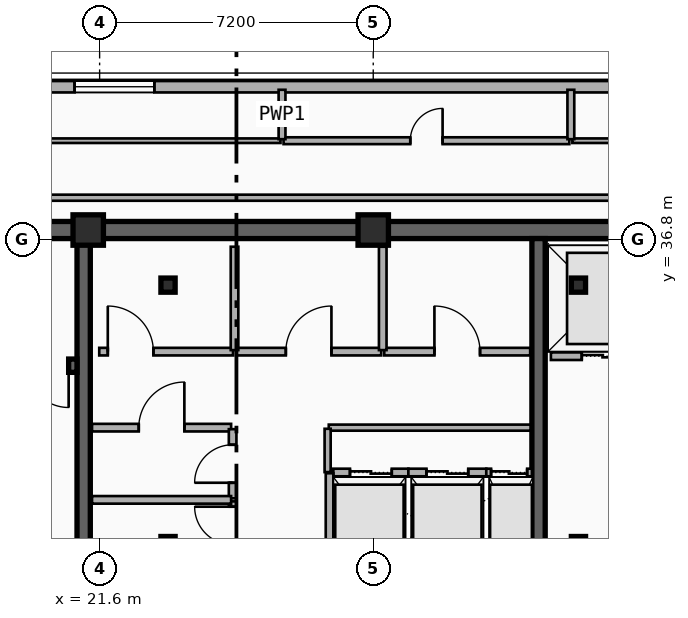
"""IFC4 building model, lengths in metres.
Left out: names, types, materials, properties, quantities, classifications, styles, units other than length and angle.
Written with IfcOpenShell. Run it as: python <this file> out.ifc"""

import sys

from ifc_helpers import new_model, si_unit, direction, frame, frame_2d, origin, origin_2d, place, context, subcontext, project, spatial, rectangle, i_section, extrude, element, fill, save


model = new_model("IFC4")
c1 = context("Model", 3, precision=1e-05, world=origin(), true_north=direction((0.0, 1.0)))
c2 = subcontext(c1, "Body", "Model", "MODEL_VIEW")
j1 = project(units=[si_unit("LENGTHUNIT", "METRE"), si_unit("PLANEANGLEUNIT", "RADIAN")], contexts=[c1])
p1 = place(None, origin())
s1 = spatial("IfcSite", under=j1, at=p1, CompositionType="ELEMENT")
p2 = place(p1, origin())
s2 = spatial("IfcBuilding", under=s1, at=p2, CompositionType="ELEMENT")
p3 = place(p2, frame((0.0, 0.0, 276.9)))
s3 = spatial("IfcBuildingStorey", under=s2, at=p3, CompositionType="ELEMENT", Elevation=276.9)
p4 = place(p3, frame((12.15, 37.05, 0.0), z_axis=(0.0, 0.0, 1.0), x_axis=(1.0, 0.0, 0.0)))
e1 = element("IfcWall", 1, at=p4, inside=s3, PredefinedType="SHEAR", context=c2, shape_type="SweptSolid", body=[
    extrude(rectangle(XDim=33.23, YDim=0.45, at=frame_2d((16.615, 0.0))), origin(), (0.0, 0.0, 1.0), 3.7),
])
for number, where, z_axis, x_axis in (
    (2, (21.18, 28.045, 0.0), (0.0, 0.0, 1.0), (0.0, 1.0, 0.0)),
    (3, (33.15, 28.045, 0.0), (0.0, 0.0, 1.0), (0.0, 1.0, 0.0)),
):
    element("IfcWall", number, at=place(p3, frame(where, z_axis=z_axis, x_axis=x_axis)), inside=s3, PredefinedType="SHEAR", context=c2, shape_type="SweptSolid", body=[
        extrude(rectangle(XDim=8.78, YDim=0.35, at=frame_2d((4.39, 0.0))), origin(), (0.0, 0.0, 1.0), 3.7),
    ])
p5 = place(p3, frame((21.005, 33.48, 0.0), z_axis=(0.0, 0.0, 1.0), x_axis=(-1.0, 0.0, 0.0)))
e4 = element("IfcWall", 4, at=p5, inside=s3, PredefinedType="SHEAR", context=c2, shape_type="SweptSolid", body=[
    extrude(rectangle(XDim=8.63, YDim=0.35, at=frame_2d((4.315, 0.0))), origin(), (0.0, 0.0, 1.0), 3.7),
])
p6 = place(p5, frame((0.22, 0.0, 0.0)))
e5 = element("IfcOpeningElement", 5, at=p6, cuts=e4, PredefinedType="OPENING", context=c2, shape_type="SweptSolid", body=[
    extrude(rectangle(XDim=1.1, YDim=2.15, at=frame_2d((0.55, 1.075))), frame((0.0, 0.185, 0.0), z_axis=(0.0, -1.0, 0.0), x_axis=(1.0, 0.0, 0.0)), (0.0, 0.0, 1.0), 0.37),
])
for number, where, z_axis, x_axis in (
    (6, (23.4, 28.8, 0.0), (0.0, 0.0, 1.0), (1.0, 0.0, 0.0)),
    (7, (34.2, 28.8, 0.0), (0.0, 0.0, 1.0), (1.0, 0.0, 0.0)),
    (8, (34.2, 35.6, 0.0), (0.0, 0.0, 1.0), (1.0, 0.0, 0.0)),
    (9, (23.4, 35.6, 0.0), (0.0, 0.0, 1.0), (1.0, 0.0, 0.0)),
):
    element("IfcColumn", number, at=place(p3, frame(where, z_axis=z_axis, x_axis=x_axis)), inside=s3, PredefinedType="COLUMN", context=c2, shape_type="SweptSolid", body=[
        extrude(i_section(OverallWidth=0.374, OverallDepth=0.372, WebThickness=0.017, FlangeThickness=0.027, FilletRadius=0.015, at=origin_2d()), origin(), (0.0, 0.0, 1.0), 3.7),
    ])
for number, where, z_axis, x_axis in (
    (10, (21.3, 37.05, 0.0), (0.0, 0.0, 1.0), (1.0, 0.0, 0.0)),
    (11, (28.8, 37.05, 0.0), (0.0, 0.0, 1.0), (1.0, 0.0, 0.0)),
):
    element("IfcColumn", number, at=place(p3, frame(where, z_axis=z_axis, x_axis=x_axis)), inside=s3, PredefinedType="COLUMN", context=c2, shape_type="SweptSolid", body=[
        extrude(rectangle(XDim=0.8, YDim=0.8, at=origin_2d()), origin(), (0.0, 0.0, 1.0), 3.7),
    ])
p7 = place(p3, frame((12.4, 40.82, 0.0), z_axis=(0.0, 0.0, 1.0), x_axis=(1.0, 0.0, 0.0)))
e12 = element("IfcWall", 12, at=p7, inside=s3, PredefinedType="SOLIDWALL", context=c2, shape_type="SweptSolid", body=[
    extrude(rectangle(XDim=32.8, YDim=0.3, at=frame_2d((16.4, 0.0))), origin(), (0.0, 0.0, 1.0), 3.38),
])
p8 = place(p7, frame((3.38, 0.0, 0.75)))
e13 = element("IfcOpeningElement", 13, at=p8, cuts=e12, PredefinedType="OPENING", context=c2, shape_type="SweptSolid", body=[
    extrude(rectangle(XDim=2.1, YDim=2.1, at=frame_2d((1.05, 1.05))), frame((0.0, 0.16, 0.0), z_axis=(0.0, -1.0, 0.0), x_axis=(1.0, 0.0, 0.0)), (0.0, 0.0, 1.0), 0.32),
])
p9 = place(p7, frame((8.54, 0.0, 0.75)))
e14 = element("IfcOpeningElement", 14, at=p9, cuts=e12, PredefinedType="OPENING", context=c2, shape_type="SweptSolid", body=[
    extrude(rectangle(XDim=2.1, YDim=2.1, at=frame_2d((1.05, 1.05))), frame((0.0, 0.16, 0.0), z_axis=(0.0, -1.0, 0.0), x_axis=(1.0, 0.0, 0.0)), (0.0, 0.0, 1.0), 0.32),
])
p10 = place(p3, frame((33.475, 33.73, 0.0), z_axis=(0.0, 0.0, 1.0), x_axis=(1.0, 0.0, 0.0)))
e15 = element("IfcWall", 15, at=p10, inside=s3, PredefinedType="PARTITIONING", context=c2, shape_type="SweptSolid", body=[
    extrude(rectangle(XDim=2.725, YDim=0.2, at=frame_2d((1.362, 0.0))), origin(), (0.0, 0.0, 1.0), 2.45),
])
p11 = place(p10, frame((0.812, 0.0, 0.0)))
e16 = element("IfcOpeningElement", 16, at=p11, cuts=e15, PredefinedType="OPENING", context=c2, shape_type="SweptSolid", body=[
    extrude(rectangle(XDim=1.1, YDim=2.15, at=frame_2d((0.55, 1.075))), frame((0.0, 0.11, 0.0), z_axis=(0.0, -1.0, 0.0), x_axis=(1.0, 0.0, 0.0)), (0.0, 0.0, 1.0), 0.22),
])
p12 = place(p3, frame((27.75, 30.67, 0.0), z_axis=(0.0, 0.0, 1.0), x_axis=(1.0, 0.0, 0.0)))
e17 = element("IfcWall", 17, at=p12, inside=s3, PredefinedType="PARTITIONING", context=c2, shape_type="SweptSolid", body=[
    extrude(rectangle(XDim=1.975, YDim=0.2, at=frame_2d((0.988, 0.0))), origin(), (0.0, 0.0, 1.0), 2.45),
])
p13 = place(p12, frame((0.438, 0.0, 0.0)))
e18 = element("IfcOpeningElement", 18, at=p13, cuts=e17, PredefinedType="OPENING", context=c2, shape_type="SweptSolid", body=[
    extrude(rectangle(XDim=1.1, YDim=2.15, at=frame_2d((0.55, 1.075))), frame((0.0, 0.11, 0.0), z_axis=(0.0, -1.0, 0.0), x_axis=(1.0, 0.0, 0.0)), (0.0, 0.0, 1.0), 0.22),
])
p14 = place(p3, frame((27.65, 28.07, 0.0), z_axis=(0.0, 0.0, 1.0), x_axis=(0.0, 1.0, 0.0)))
e19 = element("IfcWall", 19, at=p14, inside=s3, PredefinedType="PARTITIONING", context=c2, shape_type="SweptSolid", body=[
    extrude(rectangle(XDim=2.58, YDim=0.2, at=frame_2d((1.29, 0.0))), origin(), (0.0, 0.0, 1.0), 2.45),
])
p15 = place(p3, frame((29.725, 30.67, 0.0), z_axis=(0.0, 0.0, 1.0), x_axis=(1.0, 0.0, 0.0)))
e20 = element("IfcWall", 20, at=p15, inside=s3, PredefinedType="PARTITIONING", context=c2, shape_type="SweptSolid", body=[
    extrude(rectangle(XDim=2.05, YDim=0.2, at=frame_2d((1.025, 0.0))), origin(), (0.0, 0.0, 1.0), 2.76),
])
p16 = place(p15, frame((0.475, 0.0, 0.0)))
e21 = element("IfcOpeningElement", 21, at=p16, cuts=e20, PredefinedType="OPENING", context=c2, shape_type="SweptSolid", body=[
    extrude(rectangle(XDim=1.1, YDim=2.15, at=frame_2d((0.55, 1.075))), frame((0.0, 0.11, 0.0), z_axis=(0.0, -1.0, 0.0), x_axis=(1.0, 0.0, 0.0)), (0.0, 0.0, 1.0), 0.22),
])
p17 = place(p3, frame((31.775, 30.67, 0.0), z_axis=(0.0, 0.0, 1.0), x_axis=(1.0, 0.0, 0.0)))
e22 = element("IfcWall", 22, at=p17, inside=s3, PredefinedType="PARTITIONING", context=c2, shape_type="SweptSolid", body=[
    extrude(rectangle(XDim=1.2, YDim=0.2, at=frame_2d((0.6, 0.0))), origin(), (0.0, 0.0, 1.0), 2.76),
])
p18 = place(p17, frame((0.125, 0.0, 0.0)))
e23 = element("IfcOpeningElement", 23, at=p18, cuts=e22, PredefinedType="OPENING", context=c2, shape_type="SweptSolid", body=[
    extrude(rectangle(XDim=0.95, YDim=2.15, at=frame_2d((0.475, 1.075))), frame((0.0, 0.11, 0.0), z_axis=(0.0, -1.0, 0.0), x_axis=(1.0, 0.0, 0.0)), (0.0, 0.0, 1.0), 0.22),
])
p19 = place(p3, frame((21.4, 31.85, 0.0), z_axis=(0.0, 0.0, 1.0), x_axis=(1.0, 0.0, 0.0)))
e24 = element("IfcWall", 24, at=p19, inside=s3, PredefinedType="PARTITIONING", context=c2, shape_type="SweptSolid", body=[
    extrude(rectangle(XDim=3.66, YDim=0.2, at=frame_2d((1.83, 0.0))), origin(), (0.0, 0.0, 1.0), 2.45),
])
p20 = place(p19, frame((1.23, 0.0, 0.0)))
e25 = element("IfcOpeningElement", 25, at=p20, cuts=e24, PredefinedType="OPENING", context=c2, shape_type="SweptSolid", body=[
    extrude(rectangle(XDim=1.2, YDim=2.15, at=frame_2d((0.6, 1.075))), frame((0.0, 0.11, 0.0), z_axis=(0.0, -1.0, 0.0), x_axis=(1.0, 0.0, 0.0)), (0.0, 0.0, 1.0), 0.22),
])
p21 = place(p3, frame((21.59, 33.85, 0.0), z_axis=(0.0, 0.0, 1.0), x_axis=(1.0, 0.0, 0.0)))
e26 = element("IfcWall", 26, at=p21, inside=s3, PredefinedType="PARTITIONING", context=c2, shape_type="SweptSolid", body=[
    extrude(rectangle(XDim=3.52, YDim=0.2, at=frame_2d((1.76, 0.0))), origin(), (0.0, 0.0, 1.0), 2.45),
])
p22 = place(p21, frame((0.225, 0.0, 0.0)))
e27 = element("IfcOpeningElement", 27, at=p22, cuts=e26, PredefinedType="OPENING", context=c2, shape_type="SweptSolid", body=[
    extrude(rectangle(XDim=1.2, YDim=2.15, at=frame_2d((0.6, 1.075))), frame((0.0, 0.11, 0.0), z_axis=(0.0, -1.0, 0.0), x_axis=(1.0, 0.0, 0.0)), (0.0, 0.0, 1.0), 0.22),
])
p23 = place(p3, frame((25.19, 33.85, 0.0), z_axis=(0.0, 0.0, 1.0), x_axis=(1.0, 0.0, 0.0)))
e28 = element("IfcWall", 28, at=p23, inside=s3, PredefinedType="PARTITIONING", context=c2, shape_type="SweptSolid", body=[
    extrude(rectangle(XDim=3.82, YDim=0.2, at=frame_2d((1.91, 0.0))), origin(), (0.0, 0.0, 1.0), 2.45),
])
p24 = place(p23, frame((1.31, 0.0, 0.0)))
e29 = element("IfcOpeningElement", 29, at=p24, cuts=e28, PredefinedType="OPENING", context=c2, shape_type="SweptSolid", body=[
    extrude(rectangle(XDim=1.2, YDim=2.15, at=frame_2d((0.6, 1.075))), frame((0.0, 0.11, 0.0), z_axis=(0.0, -1.0, 0.0), x_axis=(1.0, 0.0, 0.0)), (0.0, 0.0, 1.0), 0.22),
])
p25 = place(p3, frame((29.09, 33.85, 0.0), z_axis=(0.0, 0.0, 1.0), x_axis=(1.0, 0.0, 0.0)))
e30 = element("IfcWall", 30, at=p25, inside=s3, PredefinedType="PARTITIONING", context=c2, shape_type="SweptSolid", body=[
    extrude(rectangle(XDim=3.84, YDim=0.2, at=frame_2d((1.92, 0.0))), origin(), (0.0, 0.0, 1.0), 2.45),
])
p26 = place(p25, frame((1.32, 0.0, 0.0)))
e31 = element("IfcOpeningElement", 31, at=p26, cuts=e30, PredefinedType="OPENING", context=c2, shape_type="SweptSolid", body=[
    extrude(rectangle(XDim=1.2, YDim=2.15, at=frame_2d((0.6, 1.075))), frame((0.0, 0.11, 0.0), z_axis=(0.0, -1.0, 0.0), x_axis=(1.0, 0.0, 0.0)), (0.0, 0.0, 1.0), 0.22),
])
p27 = place(p3, frame((25.1, 28.09, 0.0), z_axis=(0.0, 0.0, 1.0), x_axis=(0.0, 1.0, 0.0)))
e32 = element("IfcWall", 32, at=p27, inside=s3, PredefinedType="PARTITIONING", context=c2, shape_type="SweptSolid", body=[
    extrude(rectangle(XDim=1.82, YDim=0.2, at=frame_2d((0.91, 0.0))), origin(), (0.0, 0.0, 1.0), 2.76),
])
p28 = place(p27, frame((0.68, 0.0, 0.0)))
e33 = element("IfcOpeningElement", 33, at=p28, cuts=e32, PredefinedType="OPENING", context=c2, shape_type="SweptSolid", body=[
    extrude(rectangle(XDim=1.0, YDim=2.15, at=frame_2d((0.5, 1.075))), frame((0.0, 0.11, 0.0), z_axis=(0.0, -1.0, 0.0), x_axis=(1.0, 0.0, 0.0)), (0.0, 0.0, 1.0), 0.22),
])
p29 = place(p3, frame((25.1, 29.99, 0.0), z_axis=(0.0, 0.0, 1.0), x_axis=(0.0, 1.0, 0.0)))
e34 = element("IfcWall", 34, at=p29, inside=s3, PredefinedType="PARTITIONING", context=c2, shape_type="SweptSolid", body=[
    extrude(rectangle(XDim=1.82, YDim=0.2, at=frame_2d((0.91, 0.0))), origin(), (0.0, 0.0, 1.0), 3.38),
])
p30 = place(p29, frame((0.41, 0.0, 0.0)))
e35 = element("IfcOpeningElement", 35, at=p30, cuts=e34, PredefinedType="OPENING", context=c2, shape_type="SweptSolid", body=[
    extrude(rectangle(XDim=1.0, YDim=2.15, at=frame_2d((0.5, 1.075))), frame((0.0, 0.11, 0.0), z_axis=(0.0, -1.0, 0.0), x_axis=(1.0, 0.0, 0.0)), (0.0, 0.0, 1.0), 0.22),
])
p31 = place(p3, frame((21.4, 29.95, 0.0), z_axis=(0.0, 0.0, 1.0), x_axis=(1.0, 0.0, 0.0)))
e36 = element("IfcWall", 36, at=p31, inside=s3, PredefinedType="PARTITIONING", context=c2, shape_type="SweptSolid", body=[
    extrude(rectangle(XDim=3.66, YDim=0.2, at=frame_2d((1.83, 0.0))), origin(), (0.0, 0.0, 1.0), 2.45),
])
p32 = place(p3, frame((25.15, 33.89, 0.0), z_axis=(0.0, 0.0, 1.0), x_axis=(0.0, 1.0, 0.0)))
e37 = element("IfcWall", 37, at=p32, inside=s3, PredefinedType="PARTITIONING", context=c2, shape_type="SweptSolid", body=[
    extrude(rectangle(XDim=2.72, YDim=0.2, at=frame_2d((1.36, 0.0))), origin(), (0.0, 0.0, 1.0), 3.38),
])
p33 = place(p3, frame((29.05, 33.89, 0.0), z_axis=(0.0, 0.0, 1.0), x_axis=(0.0, 1.0, 0.0)))
e38 = element("IfcWall", 38, at=p33, inside=s3, PredefinedType="PARTITIONING", context=c2, shape_type="SweptSolid", body=[
    extrude(rectangle(XDim=2.72, YDim=0.2, at=frame_2d((1.36, 0.0))), origin(), (0.0, 0.0, 1.0), 2.45),
])
p34 = place(p3, frame((8.46, 39.4, 0.0), z_axis=(0.0, 0.0, 1.0), x_axis=(1.0, 0.0, 0.0)))
e39 = element("IfcWall", 39, at=p34, inside=s3, PredefinedType="PARTITIONING", context=c2, shape_type="SweptSolid", body=[
    extrude(rectangle(XDim=17.9, YDim=0.12, at=frame_2d((8.95, 0.0))), origin(), (0.0, 0.0, 1.0), 3.38),
])
p35 = place(p34, frame((8.5, 0.0, 0.0)))
e40 = element("IfcOpeningElement", 40, at=p35, cuts=e39, PredefinedType="OPENING", context=c2, shape_type="SweptSolid", body=[
    extrude(rectangle(XDim=0.9, YDim=2.1, at=frame_2d((0.45, 1.05))), frame((0.0, 0.07, 0.0), z_axis=(0.0, -1.0, 0.0), x_axis=(1.0, 0.0, 0.0)), (0.0, 0.0, 1.0), 0.14),
])
p36 = place(p3, frame((26.44, 39.4, 0.0), z_axis=(0.0, 0.0, 1.0), x_axis=(1.0, 0.0, 0.0)))
e41 = element("IfcWall", 41, at=p36, inside=s3, PredefinedType="PLUMBINGWALL", context=c2, shape_type="SweptSolid", body=[
    extrude(rectangle(XDim=7.52, YDim=0.18, at=frame_2d((3.76, 0.0))), origin(), (0.0, 0.0, 1.0), 3.38),
])
p37 = place(p36, frame((3.335, 0.0, 0.0)))
e42 = element("IfcOpeningElement", 42, at=p37, cuts=e41, PredefinedType="OPENING", context=c2, shape_type="SweptSolid", body=[
    extrude(rectangle(XDim=0.85, YDim=2.1, at=frame_2d((0.425, 1.05))), frame((0.0, 0.1, 0.0), z_axis=(0.0, -1.0, 0.0), x_axis=(1.0, 0.0, 0.0)), (0.0, 0.0, 1.0), 0.2),
])
p38 = place(p3, frame((34.04, 39.4, 0.0), z_axis=(0.0, 0.0, 1.0), x_axis=(1.0, 0.0, 0.0)))
e43 = element("IfcWall", 43, at=p38, inside=s3, PredefinedType="PARTITIONING", context=c2, shape_type="SweptSolid", body=[
    extrude(rectangle(XDim=15.1, YDim=0.12, at=frame_2d((7.55, 0.0))), origin(), (0.0, 0.0, 1.0), 3.38),
])
p39 = place(p38, frame((7.1, 0.0, 0.0)))
e44 = element("IfcOpeningElement", 44, at=p39, cuts=e43, PredefinedType="OPENING", context=c2, shape_type="SweptSolid", body=[
    extrude(rectangle(XDim=0.9, YDim=2.1, at=frame_2d((0.45, 1.05))), frame((0.0, 0.07, 0.0), z_axis=(0.0, -1.0, 0.0), x_axis=(1.0, 0.0, 0.0)), (0.0, 0.0, 1.0), 0.14),
])
for number, where, z_axis, x_axis in (
    (45, (26.4, 39.44, 0.0), (0.0, 0.0, 1.0), (0.0, 1.0, 0.0)),
    (46, (34.0, 39.44, 0.0), (0.0, 0.0, 1.0), (0.0, 1.0, 0.0)),
):
    element("IfcWall", number, at=place(p3, frame(where, z_axis=z_axis, x_axis=x_axis)), inside=s3, PredefinedType="PLUMBINGWALL", context=c2, shape_type="SweptSolid", body=[
        extrude(rectangle(XDim=1.3, YDim=0.18, at=frame_2d((0.65, 0.0))), origin(), (0.0, 0.0, 1.0), 3.38),
    ])
p40 = place(p3, frame((27.63, 31.85, 0.0), z_axis=(0.0, 0.0, 1.0), x_axis=(1.0, 0.0, 0.0)))
e47 = element("IfcWall", 47, at=p40, inside=s3, PredefinedType="PARTITIONING", context=c2, shape_type="SweptSolid", body=[
    extrude(rectangle(XDim=5.31, YDim=0.16, at=frame_2d((2.655, 0.0))), origin(), (0.0, 0.0, 1.0), 2.45),
])
p41 = place(p3, frame((27.6, 30.68, 0.0), z_axis=(0.0, 0.0, 1.0), x_axis=(0.0, 1.0, 0.0)))
e48 = element("IfcWall", 48, at=p41, inside=s3, PredefinedType="PARTITIONING", context=c2, shape_type="SweptSolid", body=[
    extrude(rectangle(XDim=1.14, YDim=0.16, at=frame_2d((0.57, 0.0))), origin(), (0.0, 0.0, 1.0), 3.38),
])
p42 = place(p3, frame((11.28, 37.9, 0.0), z_axis=(0.0, 0.0, 1.0), x_axis=(1.0, 0.0, 0.0)))
e49 = element("IfcWall", 49, at=p42, inside=s3, PredefinedType="PARTITIONING", context=c2, shape_type="SweptSolid", body=[
    extrude(rectangle(XDim=35.04, YDim=0.16, at=frame_2d((17.52, 0.0))), origin(), (0.0, 0.0, 1.0), 3.38),
])
p43 = place(p9, origin())
e50 = element("IfcWindow", 50, at=p43, inside=s3, PartitioningType="SINGLE_PANEL", PredefinedType="WINDOW", context=c2, shape_type="SweptSolid", body=[
    extrude(rectangle(XDim=2.1, YDim=2.1, at=frame_2d((1.05, 1.05))), frame((0.0, 0.03, 0.0), z_axis=(0.0, -1.0, 0.0), x_axis=(1.0, 0.0, 0.0)), (0.0, 0.0, 1.0), 0.06),
])
fill(e14, e50)
p44 = place(p11, origin())
e51 = element("IfcDoor", 51, at=p44, inside=s3, OperationType="DOUBLE_DOOR_SLIDING", PredefinedType="DOOR", context=c2, shape_type="SweptSolid", body=[
    extrude(rectangle(XDim=1.1, YDim=2.15, at=frame_2d((0.55, 1.075))), frame((0.0, 0.025, 0.0), z_axis=(0.0, -1.0, 0.0), x_axis=(1.0, 0.0, 0.0)), (0.0, 0.0, 1.0), 0.05),
])
fill(e16, e51)
p45 = place(p13, origin())
e52 = element("IfcDoor", 52, at=p45, inside=s3, OperationType="DOUBLE_DOOR_SLIDING", PredefinedType="DOOR", context=c2, shape_type="SweptSolid", body=[
    extrude(rectangle(XDim=1.1, YDim=2.15, at=frame_2d((0.55, 1.075))), frame((0.0, 0.025, 0.0), z_axis=(0.0, -1.0, 0.0), x_axis=(1.0, 0.0, 0.0)), (0.0, 0.0, 1.0), 0.05),
])
fill(e18, e52)
p46 = place(p16, origin())
e53 = element("IfcDoor", 53, at=p46, inside=s3, OperationType="DOUBLE_DOOR_SLIDING", PredefinedType="DOOR", context=c2, shape_type="SweptSolid", body=[
    extrude(rectangle(XDim=1.1, YDim=2.15, at=frame_2d((0.55, 1.075))), frame((0.0, 0.025, 0.0), z_axis=(0.0, -1.0, 0.0), x_axis=(1.0, 0.0, 0.0)), (0.0, 0.0, 1.0), 0.05),
])
fill(e21, e53)
p47 = place(p18, origin())
e54 = element("IfcDoor", 54, at=p47, inside=s3, OperationType="DOUBLE_DOOR_SLIDING", PredefinedType="DOOR", context=c2, shape_type="SweptSolid", body=[
    extrude(rectangle(XDim=0.95, YDim=2.15, at=frame_2d((0.475, 1.075))), frame((0.0, 0.025, 0.0), z_axis=(0.0, -1.0, 0.0), x_axis=(1.0, 0.0, 0.0)), (0.0, 0.0, 1.0), 0.05),
])
fill(e23, e54)
p48 = place(p6, origin())
e55 = element("IfcDoor", 55, at=p48, inside=s3, OperationType="SINGLE_SWING_LEFT", PredefinedType="DOOR", context=c2, shape_type="SweptSolid", body=[
    extrude(rectangle(XDim=1.1, YDim=2.15, at=frame_2d((0.55, 1.075))), frame((0.0, 0.025, 0.0), z_axis=(0.0, -1.0, 0.0), x_axis=(1.0, 0.0, 0.0)), (0.0, 0.0, 1.0), 0.05),
])
fill(e5, e55)
p49 = place(p20, origin())
e56 = element("IfcDoor", 56, at=p49, inside=s3, OperationType="SINGLE_SWING_RIGHT", PredefinedType="DOOR", context=c2, shape_type="SweptSolid", body=[
    extrude(rectangle(XDim=1.2, YDim=2.15, at=frame_2d((0.6, 1.075))), frame((0.0, 0.025, 0.0), z_axis=(0.0, -1.0, 0.0), x_axis=(1.0, 0.0, 0.0)), (0.0, 0.0, 1.0), 0.05),
])
fill(e25, e56)
p50 = place(p22, origin())
e57 = element("IfcDoor", 57, at=p50, inside=s3, OperationType="SINGLE_SWING_LEFT", PredefinedType="DOOR", context=c2, shape_type="SweptSolid", body=[
    extrude(rectangle(XDim=1.2, YDim=2.15, at=frame_2d((0.6, 1.075))), frame((0.0, 0.025, 0.0), z_axis=(0.0, -1.0, 0.0), x_axis=(1.0, 0.0, 0.0)), (0.0, 0.0, 1.0), 0.05),
])
fill(e27, e57)
p51 = place(p24, origin())
e58 = element("IfcDoor", 58, at=p51, inside=s3, OperationType="SINGLE_SWING_RIGHT", PredefinedType="DOOR", context=c2, shape_type="SweptSolid", body=[
    extrude(rectangle(XDim=1.2, YDim=2.15, at=frame_2d((0.6, 1.075))), frame((0.0, 0.025, 0.0), z_axis=(0.0, -1.0, 0.0), x_axis=(1.0, 0.0, 0.0)), (0.0, 0.0, 1.0), 0.05),
])
fill(e29, e58)
p52 = place(p26, origin())
e59 = element("IfcDoor", 59, at=p52, inside=s3, OperationType="SINGLE_SWING_LEFT", PredefinedType="DOOR", context=c2, shape_type="SweptSolid", body=[
    extrude(rectangle(XDim=1.2, YDim=2.15, at=frame_2d((0.6, 1.075))), frame((0.0, 0.025, 0.0), z_axis=(0.0, -1.0, 0.0), x_axis=(1.0, 0.0, 0.0)), (0.0, 0.0, 1.0), 0.05),
])
fill(e31, e59)
p53 = place(p28, origin())
e60 = element("IfcDoor", 60, at=p53, inside=s3, OperationType="SINGLE_SWING_RIGHT", PredefinedType="DOOR", context=c2, shape_type="SweptSolid", body=[
    extrude(rectangle(XDim=1.0, YDim=2.15, at=frame_2d((0.5, 1.075))), frame((0.0, 0.025, 0.0), z_axis=(0.0, -1.0, 0.0), x_axis=(1.0, 0.0, 0.0)), (0.0, 0.0, 1.0), 0.05),
])
fill(e33, e60)
p54 = place(p30, origin())
e61 = element("IfcDoor", 61, at=p54, inside=s3, OperationType="SINGLE_SWING_LEFT", PredefinedType="DOOR", context=c2, shape_type="SweptSolid", body=[
    extrude(rectangle(XDim=1.0, YDim=2.15, at=frame_2d((0.5, 1.075))), frame((0.0, 0.025, 0.0), z_axis=(0.0, -1.0, 0.0), x_axis=(1.0, 0.0, 0.0)), (0.0, 0.0, 1.0), 0.05),
])
fill(e35, e61)
p55 = place(p37, origin())
e62 = element("IfcDoor", 62, at=p55, inside=s3, OperationType="SINGLE_SWING_RIGHT", PredefinedType="DOOR", context=c2, shape_type="SweptSolid", body=[
    extrude(rectangle(XDim=0.85, YDim=2.1, at=frame_2d((0.425, 1.05))), frame((0.0, 0.025, 0.0), z_axis=(0.0, -1.0, 0.0), x_axis=(1.0, 0.0, 0.0)), (0.0, 0.0, 1.0), 0.05),
])
fill(e42, e62)
save(model, sys.argv[1])
